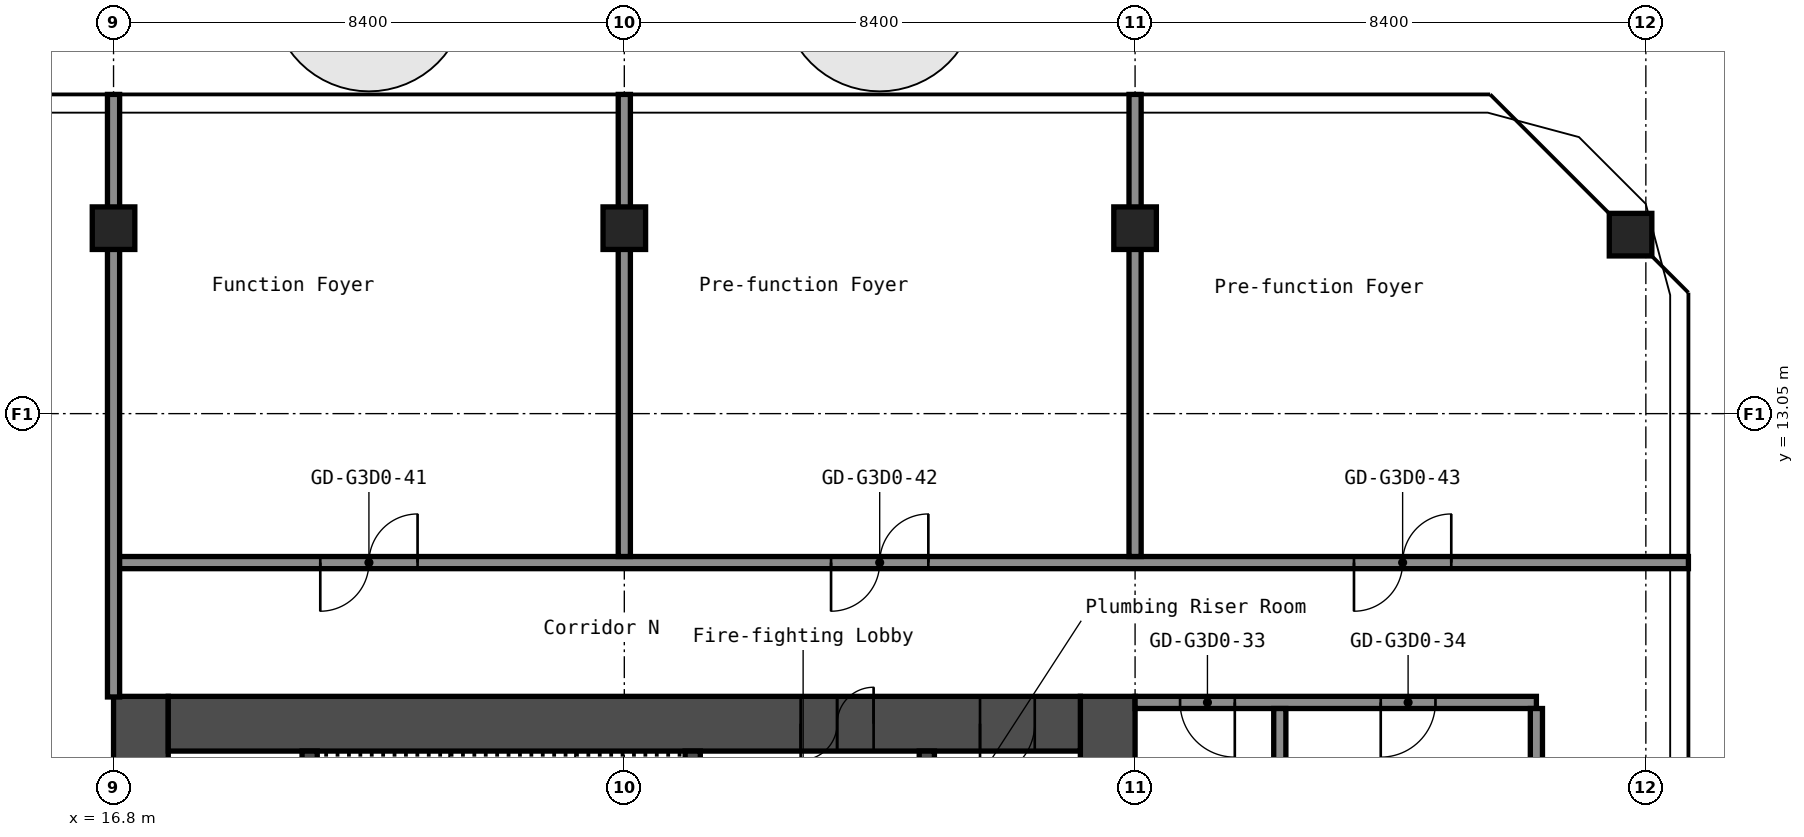
"""IFC4 building model, lengths in metres.
Left out: names, types, materials, properties, quantities, classifications, styles, units other than length and angle.
Written with IfcOpenShell. Run it as: python <this file> out.ifc"""

import sys

from ifc_helpers import new_model, si_unit, direction, frame, frame_2d, origin, origin_2d, place, context, subcontext, project, spatial, rectangle, hollow_rectangle, extrude, element, fill, save


model = new_model("IFC4")
c1 = context("Model", 3, precision=1e-05, world=origin(), true_north=direction((0.0, 1.0)))
c2 = subcontext(c1, "Body", "Model", "MODEL_VIEW")
j1 = project(units=[si_unit("LENGTHUNIT", "METRE"), si_unit("PLANEANGLEUNIT", "RADIAN")], contexts=[c1])
p1 = place(None, origin())
s1 = spatial("IfcSite", under=j1, at=p1, CompositionType="ELEMENT")
p2 = place(p1, origin())
s2 = spatial("IfcBuilding", under=s1, at=p2, CompositionType="ELEMENT")
p3 = place(p2, frame((0.0, 0.0, 140.6)))
s3 = spatial("IfcBuildingStorey", under=s2, at=p3, CompositionType="ELEMENT", Elevation=140.6)
for number, where, z_axis, x_axis in (
    (1, (16.8, 16.1, 0.0), (0.0, 0.0, 1.0), (1.0, 0.0, 0.0)),
    (2, (25.2, 16.1, 0.0), (0.0, 0.0, 1.0), (1.0, 0.0, 0.0)),
    (3, (33.6, 16.1, 0.0), (0.0, 0.0, 1.0), (1.0, 0.0, 0.0)),
    (4, (41.749, 15.994, 0.0), (0.0, 0.0, 1.0), (1.0, 0.0, 0.0)),
):
    element("IfcColumn", number, at=place(p3, frame(where, z_axis=z_axis, x_axis=x_axis)), inside=s3, PredefinedType="COLUMN", context=c2, shape_type="SweptSolid", body=[
        extrude(hollow_rectangle(XDim=0.7, YDim=0.7, WallThickness=0.028, at=origin_2d()), origin(), (0.0, 0.0, 1.0), 2.75),
    ])
p4 = place(p3, frame((17.25, -8.4, 0.0), z_axis=(0.0, 0.0, 1.0), x_axis=(0.0, 1.0, 0.0)))
e5 = element("IfcWall", 5, at=p4, inside=s3, PredefinedType="SHEAR", context=c2, shape_type="SweptSolid", body=[
    extrude(rectangle(XDim=16.8, YDim=0.9, at=frame_2d((8.4, 0.0))), origin(), (0.0, 0.0, 1.0), 2.75),
])
p5 = place(p4, frame((7.1, 0.0, 0.0)))
e6 = element("IfcOpeningElement", 6, at=p5, cuts=e5, PredefinedType="OPENING", context=c2, shape_type="SweptSolid", body=[
    extrude(rectangle(XDim=1.6, YDim=2.1, at=frame_2d((0.8, 1.05))), frame((0.0, 0.46, 0.0), z_axis=(0.0, -1.0, 0.0), x_axis=(1.0, 0.0, 0.0)), (0.0, 0.0, 1.0), 0.92),
])
p6 = place(p3, frame((33.15, -8.4, 0.0), z_axis=(0.0, 0.0, 1.0), x_axis=(0.0, 1.0, 0.0)))
e7 = element("IfcWall", 7, at=p6, inside=s3, PredefinedType="SHEAR", context=c2, shape_type="SweptSolid", body=[
    extrude(rectangle(XDim=16.8, YDim=0.9, at=frame_2d((8.4, 0.0))), origin(), (0.0, 0.0, 1.0), 2.75),
])
p7 = place(p3, frame((17.7, 7.95, 0.0), z_axis=(0.0, 0.0, 1.0), x_axis=(1.0, 0.0, 0.0)))
e8 = element("IfcWall", 8, at=p7, inside=s3, PredefinedType="SHEAR", context=c2, shape_type="SweptSolid", body=[
    extrude(rectangle(XDim=15.0, YDim=0.9, at=frame_2d((7.5, 0.0))), origin(), (0.0, 0.0, 1.0), 2.75),
])
p8 = place(p7, frame((10.4, 0.0, 0.0)))
e9 = element("IfcOpeningElement", 9, at=p8, cuts=e8, PredefinedType="OPENING", context=c2, shape_type="SweptSolid", body=[
    extrude(rectangle(XDim=1.2, YDim=2.1, at=frame_2d((0.6, 1.05))), frame((0.0, 0.46, 0.0), z_axis=(0.0, -1.0, 0.0), x_axis=(1.0, 0.0, 0.0)), (0.0, 0.0, 1.0), 0.92),
])
p9 = place(p7, frame((13.35, 0.0, 0.0)))
e10 = element("IfcOpeningElement", 10, at=p9, cuts=e8, PredefinedType="OPENING", context=c2, shape_type="SweptSolid", body=[
    extrude(rectangle(XDim=0.9, YDim=2.1, at=frame_2d((0.45, 1.05))), frame((0.0, 0.46, 0.0), z_axis=(0.0, -1.0, 0.0), x_axis=(1.0, 0.0, 0.0)), (0.0, 0.0, 1.0), 0.92),
])
p10 = place(p3, frame((20.025, 1.2, 0.0), z_axis=(0.0, 0.0, 1.0), x_axis=(0.0, 1.0, 0.0)))
e11 = element("IfcWall", 11, at=p10, inside=s3, PredefinedType="SHEAR", context=c2, shape_type="SweptSolid", body=[
    extrude(rectangle(XDim=6.3, YDim=0.25, at=frame_2d((3.15, 0.0))), origin(), (0.0, 0.0, 1.0), 2.75),
])
p11 = place(p3, frame((26.325, 3.75, 0.0), z_axis=(0.0, 0.0, 1.0), x_axis=(0.0, 1.0, 0.0)))
e12 = element("IfcWall", 12, at=p11, inside=s3, PredefinedType="SHEAR", context=c2, shape_type="SweptSolid", body=[
    extrude(rectangle(XDim=3.75, YDim=0.25, at=frame_2d((1.875, 0.0))), origin(), (0.0, 0.0, 1.0), 2.75),
])
p12 = place(p11, frame((1.25, 0.0, 0.0)))
e13 = element("IfcOpeningElement", 13, at=p12, cuts=e12, PredefinedType="OPENING", context=c2, shape_type="SweptSolid", body=[
    extrude(rectangle(XDim=1.2, YDim=2.1, at=frame_2d((0.6, 1.05))), frame((0.0, 0.135, 0.0), z_axis=(0.0, -1.0, 0.0), x_axis=(1.0, 0.0, 0.0)), (0.0, 0.0, 1.0), 0.27),
])
p13 = place(p3, frame((30.175, 1.45, 0.0), z_axis=(0.0, 0.0, 1.0), x_axis=(0.0, 1.0, 0.0)))
e14 = element("IfcWall", 14, at=p13, inside=s3, PredefinedType="SHEAR", context=c2, shape_type="SweptSolid", body=[
    extrude(rectangle(XDim=6.05, YDim=0.25, at=frame_2d((3.025, 0.0))), origin(), (0.0, 0.0, 1.0), 2.75),
])
p14 = place(p13, frame((2.625, 0.0, 0.0)))
e15 = element("IfcOpeningElement", 15, at=p14, cuts=e14, PredefinedType="OPENING", context=c2, shape_type="SweptSolid", body=[
    extrude(rectangle(XDim=1.1, YDim=2.1, at=frame_2d((0.55, 1.05))), frame((0.0, 0.135, 0.0), z_axis=(0.0, -1.0, 0.0), x_axis=(1.0, 0.0, 0.0)), (0.0, 0.0, 1.0), 0.27),
])
p15 = place(p3, frame((33.6, 8.3, 0.0), z_axis=(0.0, 0.0, 1.0), x_axis=(1.0, 0.0, 0.0)))
e16 = element("IfcWall", 16, at=p15, inside=s3, PredefinedType="PARTITIONING", context=c2, shape_type="SweptSolid", body=[
    extrude(rectangle(XDim=6.6, YDim=0.2, at=frame_2d((3.3, 0.0))), origin(), (0.0, 0.0, 1.0), 2.75),
])
p16 = place(p15, frame((0.74, 0.0, 0.0)))
e17 = element("IfcOpeningElement", 17, at=p16, cuts=e16, PredefinedType="OPENING", context=c2, shape_type="SweptSolid", body=[
    extrude(rectangle(XDim=0.9, YDim=2.1, at=frame_2d((0.45, 1.05))), frame((0.0, 0.11, 0.0), z_axis=(0.0, -1.0, 0.0), x_axis=(1.0, 0.0, 0.0)), (0.0, 0.0, 1.0), 0.22),
])
p17 = place(p15, frame((4.04, 0.0, 0.0)))
e18 = element("IfcOpeningElement", 18, at=p17, cuts=e16, PredefinedType="OPENING", context=c2, shape_type="SweptSolid", body=[
    extrude(rectangle(XDim=0.9, YDim=2.1, at=frame_2d((0.45, 1.05))), frame((0.0, 0.11, 0.0), z_axis=(0.0, -1.0, 0.0), x_axis=(1.0, 0.0, 0.0)), (0.0, 0.0, 1.0), 0.22),
])
p18 = place(p3, frame((16.8, 10.6, 0.0), z_axis=(0.0, 0.0, 1.0), x_axis=(1.0, 0.0, 0.0)))
e19 = element("IfcWall", 19, at=p18, inside=s3, PredefinedType="PARTITIONING", context=c2, shape_type="SweptSolid", body=[
    extrude(rectangle(XDim=25.9, YDim=0.2, at=frame_2d((12.95, 0.0))), origin(), (0.0, 0.0, 1.0), 2.75),
])
p19 = place(p18, frame((3.4, 0.0, 0.0)))
e20 = element("IfcOpeningElement", 20, at=p19, cuts=e19, PredefinedType="OPENING", context=c2, shape_type="SweptSolid", body=[
    extrude(rectangle(XDim=1.6, YDim=2.1, at=frame_2d((0.8, 1.05))), frame((0.0, 0.11, 0.0), z_axis=(0.0, -1.0, 0.0), x_axis=(1.0, 0.0, 0.0)), (0.0, 0.0, 1.0), 0.22),
])
p20 = place(p18, frame((11.8, 0.0, 0.0)))
e21 = element("IfcOpeningElement", 21, at=p20, cuts=e19, PredefinedType="OPENING", context=c2, shape_type="SweptSolid", body=[
    extrude(rectangle(XDim=1.6, YDim=2.1, at=frame_2d((0.8, 1.05))), frame((0.0, 0.11, 0.0), z_axis=(0.0, -1.0, 0.0), x_axis=(1.0, 0.0, 0.0)), (0.0, 0.0, 1.0), 0.22),
])
p21 = place(p18, frame((20.4, 0.0, 0.0)))
e22 = element("IfcOpeningElement", 22, at=p21, cuts=e19, PredefinedType="OPENING", context=c2, shape_type="SweptSolid", body=[
    extrude(rectangle(XDim=1.6, YDim=2.1, at=frame_2d((0.8, 1.05))), frame((0.0, 0.11, 0.0), z_axis=(0.0, -1.0, 0.0), x_axis=(1.0, 0.0, 0.0)), (0.0, 0.0, 1.0), 0.22),
])
p22 = place(p3, frame((16.8, 8.39, 0.0), z_axis=(0.0, 0.0, 1.0), x_axis=(0.0, 1.0, 0.0)))
e23 = element("IfcWall", 23, at=p22, inside=s3, PredefinedType="PARTITIONING", context=c2, shape_type="SweptSolid", body=[
    extrude(rectangle(XDim=9.91, YDim=0.2, at=frame_2d((4.955, 0.0))), origin(), (0.0, 0.0, 1.0), 2.75),
])
for number, where, z_axis, x_axis in (
    (24, (25.2, 10.7, 0.0), (0.0, 0.0, 1.0), (0.0, 1.0, 0.0)),
    (25, (33.6, 10.7, 0.0), (0.0, 0.0, 1.0), (0.0, 1.0, 0.0)),
):
    element("IfcWall", number, at=place(p3, frame(where, z_axis=z_axis, x_axis=x_axis)), inside=s3, PredefinedType="PARTITIONING", context=c2, shape_type="SweptSolid", body=[
        extrude(rectangle(XDim=7.6, YDim=0.2, at=frame_2d((3.8, 0.0))), origin(), (0.0, 0.0, 1.0), 2.75),
    ])
p23 = place(p3, frame((35.98, 0.0, 0.0), z_axis=(0.0, 0.0, 1.0), x_axis=(0.0, 1.0, 0.0)))
e26 = element("IfcWall", 26, at=p23, inside=s3, PredefinedType="PARTITIONING", context=c2, shape_type="SweptSolid", body=[
    extrude(rectangle(XDim=8.2, YDim=0.2, at=frame_2d((4.1, 0.0))), origin(), (0.0, 0.0, 1.0), 2.75),
])
p24 = place(p3, frame((40.2, -8.2, 0.0), z_axis=(0.0, 0.0, 1.0), x_axis=(0.0, 1.0, 0.0)))
e27 = element("IfcWall", 27, at=p24, inside=s3, PredefinedType="PARTITIONING", context=c2, shape_type="SweptSolid", body=[
    extrude(rectangle(XDim=16.4, YDim=0.2, at=frame_2d((8.2, 0.0))), origin(), (0.0, 0.0, 1.0), 2.75),
])
p25 = place(p8, origin())
e28 = element("IfcDoor", 28, at=p25, inside=s3, OperationType="DOUBLE_DOOR_SINGLE_SWING", PredefinedType="DOOR", context=c2, shape_type="SweptSolid", body=[
    extrude(rectangle(XDim=1.2, YDim=2.1, at=frame_2d((0.6, 1.05))), frame((0.0, 0.025, 0.0), z_axis=(0.0, -1.0, 0.0), x_axis=(1.0, 0.0, 0.0)), (0.0, 0.0, 1.0), 0.05),
])
fill(e9, e28)
p26 = place(p9, origin())
e29 = element("IfcDoor", 29, at=p26, inside=s3, OperationType="SINGLE_SWING_LEFT", PredefinedType="DOOR", context=c2, shape_type="SweptSolid", body=[
    extrude(rectangle(XDim=0.9, YDim=2.1, at=frame_2d((0.45, 1.05))), frame((0.0, 0.025, 0.0), z_axis=(0.0, -1.0, 0.0), x_axis=(1.0, 0.0, 0.0)), (0.0, 0.0, 1.0), 0.05),
])
fill(e10, e29)
p27 = place(p16, origin())
e30 = element("IfcDoor", 30, at=p27, inside=s3, OperationType="SINGLE_SWING_RIGHT", PredefinedType="DOOR", context=c2, shape_type="SweptSolid", body=[
    extrude(rectangle(XDim=0.9, YDim=2.1, at=frame_2d((0.45, 1.05))), frame((0.0, 0.025, 0.0), z_axis=(0.0, -1.0, 0.0), x_axis=(1.0, 0.0, 0.0)), (0.0, 0.0, 1.0), 0.05),
])
fill(e17, e30)
p28 = place(p17, origin())
e31 = element("IfcDoor", 31, at=p28, inside=s3, OperationType="SINGLE_SWING_LEFT", PredefinedType="DOOR", context=c2, shape_type="SweptSolid", body=[
    extrude(rectangle(XDim=0.9, YDim=2.1, at=frame_2d((0.45, 1.05))), frame((0.0, 0.025, 0.0), z_axis=(0.0, -1.0, 0.0), x_axis=(1.0, 0.0, 0.0)), (0.0, 0.0, 1.0), 0.05),
])
fill(e18, e31)
p29 = place(p19, origin())
e32 = element("IfcDoor", 32, at=p29, inside=s3, OperationType="DOUBLE_DOOR_SINGLE_SWING", PredefinedType="DOOR", context=c2, shape_type="SweptSolid", body=[
    extrude(rectangle(XDim=1.6, YDim=2.1, at=frame_2d((0.8, 1.05))), frame((0.0, 0.025, 0.0), z_axis=(0.0, -1.0, 0.0), x_axis=(1.0, 0.0, 0.0)), (0.0, 0.0, 1.0), 0.05),
])
fill(e20, e32)
p30 = place(p20, origin())
e33 = element("IfcDoor", 33, at=p30, inside=s3, OperationType="DOUBLE_DOOR_SINGLE_SWING", PredefinedType="DOOR", context=c2, shape_type="SweptSolid", body=[
    extrude(rectangle(XDim=1.6, YDim=2.1, at=frame_2d((0.8, 1.05))), frame((0.0, 0.025, 0.0), z_axis=(0.0, -1.0, 0.0), x_axis=(1.0, 0.0, 0.0)), (0.0, 0.0, 1.0), 0.05),
])
fill(e21, e33)
p31 = place(p21, origin())
e34 = element("IfcDoor", 34, at=p31, inside=s3, OperationType="DOUBLE_DOOR_SINGLE_SWING", PredefinedType="DOOR", context=c2, shape_type="SweptSolid", body=[
    extrude(rectangle(XDim=1.6, YDim=2.1, at=frame_2d((0.8, 1.05))), frame((0.0, 0.025, 0.0), z_axis=(0.0, -1.0, 0.0), x_axis=(1.0, 0.0, 0.0)), (0.0, 0.0, 1.0), 0.05),
])
fill(e22, e34)
save(model, sys.argv[1])
